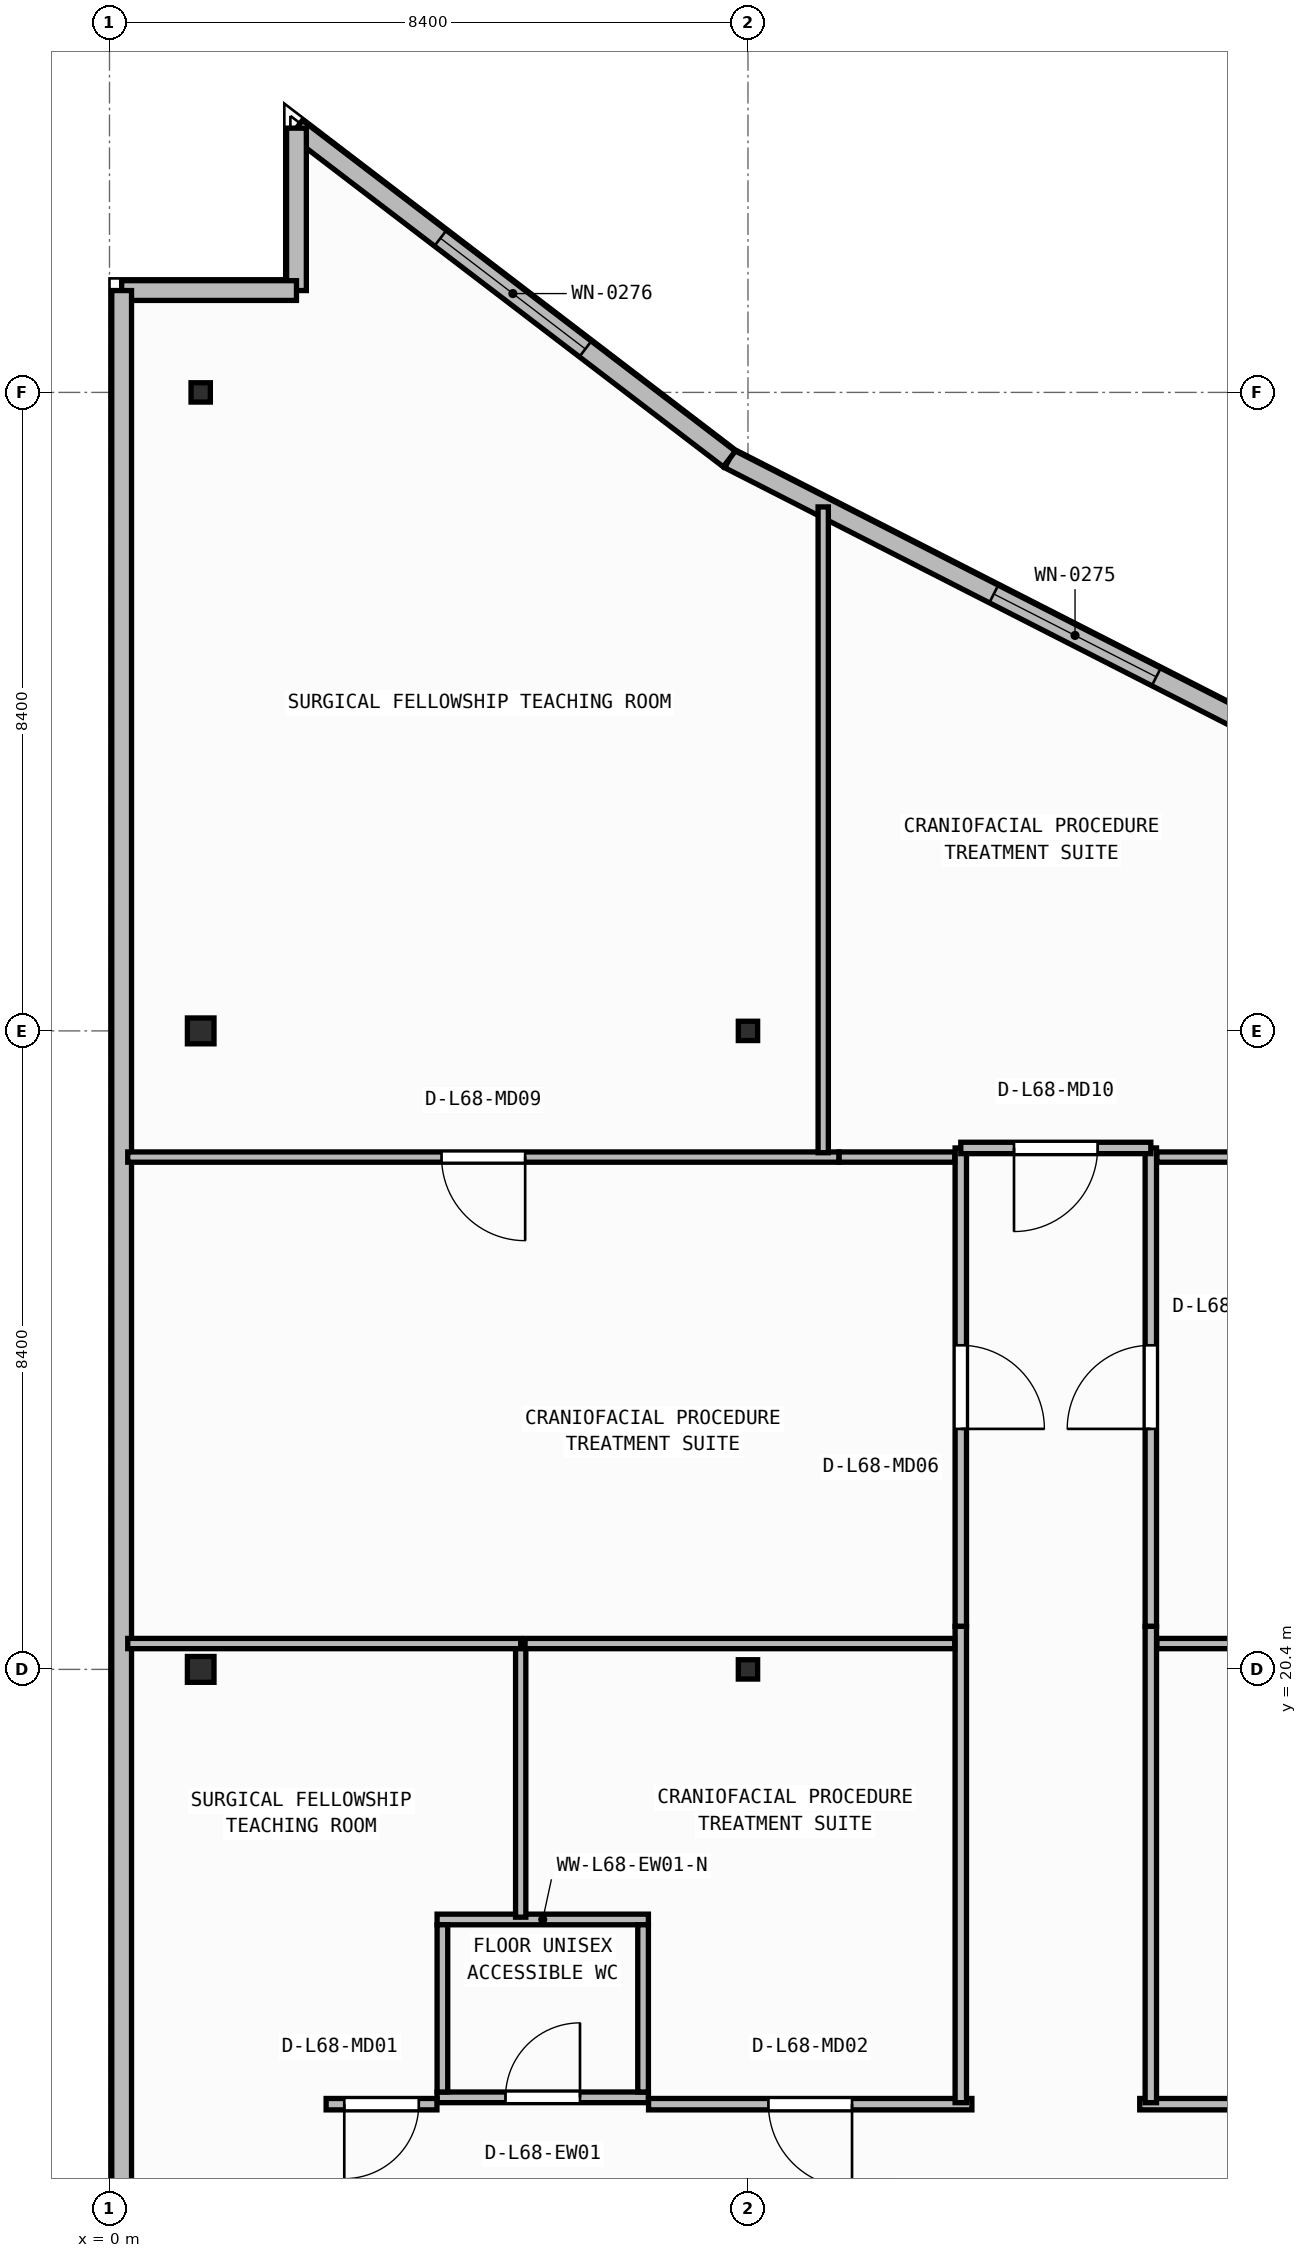
"""IFC4 building model, lengths in metres.
Left out: names, types, materials, properties, quantities, classifications, styles, units other than length and angle.
Written with IfcOpenShell. Run it as: python <this file> out.ifc"""

import sys

from ifc_helpers import new_model, si_unit, direction, frame, frame_2d, origin, origin_2d, place, context, subcontext, project, spatial, rectangle, i_section, extrude, element, fill, save


model = new_model("IFC4")
c1 = context("Model", 3, precision=1e-05, world=origin(), true_north=direction((0.0, 1.0)))
c2 = subcontext(c1, "Body", "Model", "MODEL_VIEW")
j1 = project(units=[si_unit("LENGTHUNIT", "METRE"), si_unit("PLANEANGLEUNIT", "RADIAN")], contexts=[c1])
p1 = place(None, origin())
s1 = spatial("IfcSite", under=j1, at=p1, CompositionType="ELEMENT")
p2 = place(p1, origin())
s2 = spatial("IfcBuilding", under=s1, at=p2, CompositionType="ELEMENT")
p3 = place(p2, frame((0.0, 0.0, 276.3)))
s3 = spatial("IfcBuildingStorey", under=s2, at=p3, CompositionType="ELEMENT", Elevation=276.3)
p4 = place(p3, frame((1.2, 20.4, 0.0), z_axis=(0.0, 0.0, 1.0), x_axis=(1.0, 0.0, 0.0)))
e1 = element("IfcColumn", 1, at=p4, inside=s3, PredefinedType="COLUMN", context=c2, shape_type="SweptSolid", body=[
    extrude(i_section(OverallWidth=0.35, OverallDepth=0.34, WebThickness=0.016, FlangeThickness=0.028, at=origin_2d()), origin(), (0.0, 0.0, 1.0), 3.95),
])
p5 = place(p3, frame((8.4, 20.4, 0.0), z_axis=(0.0, 0.0, 1.0), x_axis=(1.0, 0.0, 0.0)))
e2 = element("IfcColumn", 2, at=p5, inside=s3, PredefinedType="COLUMN", context=c2, shape_type="SweptSolid", body=[
    extrude(i_section(OverallWidth=0.254, OverallDepth=0.254, WebThickness=0.009, FlangeThickness=0.014, FilletRadius=0.013, at=origin_2d()), origin(), (0.0, 0.0, 1.0), 3.95),
])
p6 = place(p3, frame((1.2, 28.8, 0.0), z_axis=(0.0, 0.0, 1.0), x_axis=(1.0, 0.0, 0.0)))
e3 = element("IfcColumn", 3, at=p6, inside=s3, PredefinedType="COLUMN", context=c2, shape_type="SweptSolid", body=[
    extrude(i_section(OverallWidth=0.35, OverallDepth=0.34, WebThickness=0.016, FlangeThickness=0.028, at=origin_2d()), origin(), (0.0, 0.0, 1.0), 3.95),
])
for number, where, z_axis, x_axis in (
    (4, (8.4, 28.8, 0.0), (0.0, 0.0, 1.0), (1.0, 0.0, 0.0)),
    (5, (1.2, 37.2, 0.0), (0.0, 0.0, 1.0), (1.0, 0.0, 0.0)),
):
    element("IfcColumn", number, at=place(p3, frame(where, z_axis=z_axis, x_axis=x_axis)), inside=s3, PredefinedType="COLUMN", context=c2, shape_type="SweptSolid", body=[
        extrude(i_section(OverallWidth=0.254, OverallDepth=0.254, WebThickness=0.009, FlangeThickness=0.014, FilletRadius=0.013, at=origin_2d()), origin(), (0.0, 0.0, 1.0), 3.95),
    ])
p7 = place(p3, frame((17.251, 31.681, 0.0), z_axis=(0.0, 0.0, 1.0), x_axis=(-0.89069629535, 0.454598844532, 0.0)))
e6 = element("IfcWall", 6, at=p7, inside=s3, PredefinedType="STANDARD", context=c2, shape_type="SweptSolid", body=[
    extrude(rectangle(XDim=10.214, YDim=0.26, at=frame_2d((5.107, 0.0))), origin(), (0.0, 0.0, 1.0), 3.71),
])
p8 = place(p7, frame((3.907, 0.0, 0.9)))
e7 = element("IfcOpeningElement", 7, at=p8, cuts=e6, PredefinedType="OPENING", context=c2, shape_type="SweptSolid", body=[
    extrude(rectangle(XDim=2.4, YDim=1.65, at=frame_2d((1.2, 0.825))), frame((0.0, 0.14, 0.0), z_axis=(0.0, -1.0, 0.0), x_axis=(1.0, 0.0, 0.0)), (0.0, 0.0, 1.0), 0.28),
])
p9 = place(p3, frame((8.154, 36.324, 0.0), z_axis=(0.0, 0.0, 1.0), x_axis=(-0.794522176632, 0.607235136368, 0.0)))
e8 = element("IfcWall", 8, at=p9, inside=s3, PredefinedType="STANDARD", context=c2, shape_type="SweptSolid", body=[
    extrude(rectangle(XDim=7.167, YDim=0.26, at=frame_2d((3.583, 0.0))), origin(), (0.0, 0.0, 1.0), 3.71),
])
p10 = place(p9, frame((2.384, 0.0, 0.9)))
e9 = element("IfcOpeningElement", 9, at=p10, cuts=e8, PredefinedType="OPENING", context=c2, shape_type="SweptSolid", body=[
    extrude(rectangle(XDim=2.4, YDim=1.65, at=frame_2d((1.2, 0.825))), frame((0.0, 0.14, 0.0), z_axis=(0.0, -1.0, 0.0), x_axis=(1.0, 0.0, 0.0)), (0.0, 0.0, 1.0), 0.28),
])
p11 = place(p3, frame((2.46, 40.676, 0.0), z_axis=(0.0, 0.0, 1.0), x_axis=(0.0, -1.0, 0.0)))
e10 = element("IfcWall", 10, at=p11, inside=s3, PredefinedType="STANDARD", context=c2, shape_type="SweptSolid", body=[
    extrude(rectangle(XDim=2.136, YDim=0.26, at=frame_2d((1.068, 0.0))), origin(), (0.0, 0.0, 1.0), 3.71),
])
p12 = place(p3, frame((2.46, 38.54, 0.0), z_axis=(0.0, 0.0, 1.0), x_axis=(-1.0, 0.0, 0.0)))
e11 = element("IfcWall", 11, at=p12, inside=s3, PredefinedType="STANDARD", context=c2, shape_type="SweptSolid", body=[
    extrude(rectangle(XDim=2.3, YDim=0.26, at=frame_2d((1.15, 0.0))), origin(), (0.0, 0.0, 1.0), 3.71),
])
p13 = place(p3, frame((0.16, 38.54, 0.0), z_axis=(0.0, 0.0, 1.0), x_axis=(0.0, -1.0, 0.0)))
e12 = element("IfcWall", 12, at=p13, inside=s3, PredefinedType="STANDARD", context=c2, shape_type="SweptSolid", body=[
    extrude(rectangle(XDim=36.08, YDim=0.26, at=frame_2d((18.04, 0.0))), origin(), (0.0, 0.0, 1.0), 3.71),
])
p14 = place(p13, frame((25.75, 0.0, 0.9)))
e13 = element("IfcOpeningElement", 13, at=p14, cuts=e12, PredefinedType="OPENING", context=c2, shape_type="SweptSolid", body=[
    extrude(rectangle(XDim=2.4, YDim=1.65, at=frame_2d((1.2, 0.825))), frame((0.0, 0.14, 0.0), z_axis=(0.0, -1.0, 0.0), x_axis=(1.0, 0.0, 0.0)), (0.0, 0.0, 1.0), 0.28),
])
p15 = place(p3, frame((4.31, 14.77, 0.0), z_axis=(0.0, 0.0, 1.0), x_axis=(1.0, 0.0, 0.0)))
e14 = element("IfcWall", 14, at=p15, inside=s3, PredefinedType="PARTITIONING", context=c2, shape_type="SweptSolid", body=[
    extrude(rectangle(XDim=2.78, YDim=0.14, at=frame_2d((1.39, 0.0))), origin(), (0.0, 0.0, 1.0), 3.71),
])
p16 = place(p15, frame((0.9, 0.0, 0.0)))
e15 = element("IfcOpeningElement", 15, at=p16, cuts=e14, PredefinedType="OPENING", context=c2, shape_type="SweptSolid", body=[
    extrude(rectangle(XDim=0.98, YDim=2.1, at=frame_2d((0.49, 1.05))), frame((0.0, 0.08, 0.0), z_axis=(0.0, -1.0, 0.0), x_axis=(1.0, 0.0, 0.0)), (0.0, 0.0, 1.0), 0.16),
])
p17 = place(p3, frame((4.31, 17.11, 0.0), z_axis=(0.0, 0.0, 1.0), x_axis=(1.0, 0.0, 0.0)))
e16 = element("IfcWall", 16, at=p17, inside=s3, PredefinedType="PARTITIONING", context=c2, shape_type="SweptSolid", body=[
    extrude(rectangle(XDim=2.78, YDim=0.14, at=frame_2d((1.39, 0.0))), origin(), (0.0, 0.0, 1.0), 3.71),
])
for number, where, z_axis, x_axis in (
    (17, (4.38, 14.84, 0.0), (0.0, 0.0, 1.0), (0.0, 1.0, 0.0)),
    (18, (7.02, 14.84, 0.0), (0.0, 0.0, 1.0), (0.0, 1.0, 0.0)),
):
    element("IfcWall", number, at=place(p3, frame(where, z_axis=z_axis, x_axis=x_axis)), inside=s3, PredefinedType="PARTITIONING", context=c2, shape_type="SweptSolid", body=[
        extrude(rectangle(XDim=2.2, YDim=0.14, at=frame_2d((1.1, 0.0))), origin(), (0.0, 0.0, 1.0), 3.71),
    ])
p18 = place(p3, frame((4.308, 14.68, 0.0), z_axis=(0.0, 0.0, 1.0), x_axis=(-1.0, 0.0, 0.0)))
e19 = element("IfcWall", 19, at=p18, inside=s3, PredefinedType="PARTITIONING", context=c2, shape_type="SweptSolid", body=[
    extrude(rectangle(XDim=1.458, YDim=0.15, at=frame_2d((0.729, 0.0))), origin(), (0.0, 0.0, 1.0), 3.71),
])
p19 = place(p18, frame((0.239, 0.0, 0.0)))
e20 = element("IfcOpeningElement", 20, at=p19, cuts=e19, PredefinedType="OPENING", context=c2, shape_type="SweptSolid", body=[
    extrude(rectangle(XDim=0.98, YDim=2.1, at=frame_2d((0.49, 1.05))), frame((0.0, 0.085, 0.0), z_axis=(0.0, -1.0, 0.0), x_axis=(1.0, 0.0, 0.0)), (0.0, 0.0, 1.0), 0.17),
])
p20 = place(p3, frame((11.346, 14.68, 0.0), z_axis=(0.0, 0.0, 1.0), x_axis=(-1.0, 0.0, 0.0)))
e21 = element("IfcWall", 21, at=p20, inside=s3, PredefinedType="PARTITIONING", context=c2, shape_type="SweptSolid", body=[
    extrude(rectangle(XDim=4.254, YDim=0.15, at=frame_2d((2.127, 0.0))), origin(), (0.0, 0.0, 1.0), 3.71),
])
p21 = place(p20, frame((1.577, 0.0, 0.0)))
e22 = element("IfcOpeningElement", 22, at=p21, cuts=e21, PredefinedType="OPENING", context=c2, shape_type="SweptSolid", body=[
    extrude(rectangle(XDim=1.1, YDim=2.1, at=frame_2d((0.55, 1.05))), frame((0.0, 0.085, 0.0), z_axis=(0.0, -1.0, 0.0), x_axis=(1.0, 0.0, 0.0)), (0.0, 0.0, 1.0), 0.17),
])
p22 = place(p3, frame((18.116, 14.68, 0.0), z_axis=(0.0, 0.0, 1.0), x_axis=(-1.0, 0.0, 0.0)))
e23 = element("IfcWall", 23, at=p22, inside=s3, PredefinedType="PARTITIONING", context=c2, shape_type="SweptSolid", body=[
    extrude(rectangle(XDim=4.562, YDim=0.15, at=frame_2d((2.281, 0.0))), origin(), (0.0, 0.0, 1.0), 3.71),
])
p23 = place(p22, frame((1.731, 0.0, 0.0)))
e24 = element("IfcOpeningElement", 24, at=p23, cuts=e23, PredefinedType="OPENING", context=c2, shape_type="SweptSolid", body=[
    extrude(rectangle(XDim=1.1, YDim=2.1, at=frame_2d((0.55, 1.05))), frame((0.0, 0.085, 0.0), z_axis=(0.0, -1.0, 0.0), x_axis=(1.0, 0.0, 0.0)), (0.0, 0.0, 1.0), 0.17),
])
for number, where, z_axis, x_axis in (
    (25, (11.2, 20.966, 0.0), (0.0, 0.0, 1.0), (0.0, -1.0, 0.0)),
    (26, (13.7, 14.7, 0.0), (0.0, 0.0, 1.0), (0.0, 1.0, 0.0)),
):
    element("IfcWall", number, at=place(p3, frame(where, z_axis=z_axis, x_axis=x_axis)), inside=s3, PredefinedType="PARTITIONING", context=c2, shape_type="SweptSolid", body=[
        extrude(rectangle(XDim=6.266, YDim=0.15, at=frame_2d((3.133, 0.0))), origin(), (0.0, 0.0, 1.0), 3.71),
    ])
p24 = place(p3, frame((11.2, 27.26, 0.0), z_axis=(0.0, 0.0, 1.0), x_axis=(0.0, -1.0, 0.0)))
e27 = element("IfcWall", 27, at=p24, inside=s3, PredefinedType="PARTITIONING", context=c2, shape_type="SweptSolid", body=[
    extrude(rectangle(XDim=6.292, YDim=0.15, at=frame_2d((3.146, 0.0))), origin(), (0.0, 0.0, 1.0), 3.71),
])
p25 = place(p24, frame((2.596, 0.0, 0.0)))
e28 = element("IfcOpeningElement", 28, at=p25, cuts=e27, PredefinedType="OPENING", context=c2, shape_type="SweptSolid", body=[
    extrude(rectangle(XDim=1.1, YDim=2.1, at=frame_2d((0.55, 1.05))), frame((0.0, 0.085, 0.0), z_axis=(0.0, -1.0, 0.0), x_axis=(1.0, 0.0, 0.0)), (0.0, 0.0, 1.0), 0.17),
])
p26 = place(p3, frame((13.7, 20.968, 0.0), z_axis=(0.0, 0.0, 1.0), x_axis=(0.0, 1.0, 0.0)))
e29 = element("IfcWall", 29, at=p26, inside=s3, PredefinedType="PARTITIONING", context=c2, shape_type="SweptSolid", body=[
    extrude(rectangle(XDim=6.292, YDim=0.15, at=frame_2d((3.146, 0.0))), origin(), (0.0, 0.0, 1.0), 3.71),
])
p27 = place(p26, frame((2.596, 0.0, 0.0)))
e30 = element("IfcOpeningElement", 30, at=p27, cuts=e29, PredefinedType="OPENING", context=c2, shape_type="SweptSolid", body=[
    extrude(rectangle(XDim=1.1, YDim=2.1, at=frame_2d((0.55, 1.05))), frame((0.0, 0.085, 0.0), z_axis=(0.0, -1.0, 0.0), x_axis=(1.0, 0.0, 0.0)), (0.0, 0.0, 1.0), 0.17),
])
p28 = place(p3, frame((13.7, 27.26, 0.0), z_axis=(0.0, 0.0, 1.0), x_axis=(-1.0, 0.0, 0.0)))
e31 = element("IfcWall", 31, at=p28, inside=s3, PredefinedType="PARTITIONING", context=c2, shape_type="SweptSolid", body=[
    extrude(rectangle(XDim=2.5, YDim=0.15, at=frame_2d((1.25, 0.0))), origin(), (0.0, 0.0, 1.0), 3.71),
])
p29 = place(p28, frame((0.7, 0.0, 0.0)))
e32 = element("IfcOpeningElement", 32, at=p29, cuts=e31, PredefinedType="OPENING", context=c2, shape_type="SweptSolid", body=[
    extrude(rectangle(XDim=1.1, YDim=2.1, at=frame_2d((0.55, 1.05))), frame((0.0, 0.085, 0.0), z_axis=(0.0, -1.0, 0.0), x_axis=(1.0, 0.0, 0.0)), (0.0, 0.0, 1.0), 0.17),
])
p30 = place(p3, frame((5.41, 17.14, 0.0), z_axis=(0.0, 0.0, 1.0), x_axis=(0.0, 1.0, 0.0)))
e33 = element("IfcWall", 33, at=p30, inside=s3, PredefinedType="PARTITIONING", context=c2, shape_type="SweptSolid", body=[
    extrude(rectangle(XDim=3.6, YDim=0.135, at=frame_2d((1.8, 0.0))), origin(), (0.0, 0.0, 1.0), 3.71),
])
p31 = place(p3, frame((5.41, 20.74, 0.0), z_axis=(0.0, 0.0, 1.0), x_axis=(-1.0, 0.0, 0.0)))
e34 = element("IfcWall", 34, at=p31, inside=s3, PredefinedType="PARTITIONING", context=c2, shape_type="SweptSolid", body=[
    extrude(rectangle(XDim=5.17, YDim=0.135, at=frame_2d((2.585, 0.0))), origin(), (0.0, 0.0, 1.0), 3.157),
])
p32 = place(p3, frame((11.12, 20.74, 0.0), z_axis=(0.0, 0.0, 1.0), x_axis=(-1.0, 0.0, 0.0)))
e35 = element("IfcWall", 35, at=p32, inside=s3, PredefinedType="PARTITIONING", context=c2, shape_type="SweptSolid", body=[
    extrude(rectangle(XDim=5.653, YDim=0.135, at=frame_2d((2.826, 0.0))), origin(), (0.0, 0.0, 1.0), 3.157),
])
p33 = place(p3, frame((17.89, 20.74, 0.0), z_axis=(0.0, 0.0, 1.0), x_axis=(-1.0, 0.0, 0.0)))
e36 = element("IfcWall", 36, at=p33, inside=s3, PredefinedType="PARTITIONING", context=c2, shape_type="SweptSolid", body=[
    extrude(rectangle(XDim=4.11, YDim=0.135, at=frame_2d((2.055, 0.0))), origin(), (0.0, 0.0, 1.0), 3.157),
])
p34 = place(p3, frame((9.597, 27.14, 0.0), z_axis=(0.0, 0.0, 1.0), x_axis=(-1.0, 0.0, 0.0)))
e37 = element("IfcWall", 37, at=p34, inside=s3, PredefinedType="PARTITIONING", context=c2, shape_type="SweptSolid", body=[
    extrude(rectangle(XDim=9.357, YDim=0.135, at=frame_2d((4.679, 0.0))), origin(), (0.0, 0.0, 1.0), 3.71),
])
p35 = place(p34, frame((4.129, 0.0, 0.0)))
e38 = element("IfcOpeningElement", 38, at=p35, cuts=e37, PredefinedType="OPENING", context=c2, shape_type="SweptSolid", body=[
    extrude(rectangle(XDim=1.1, YDim=2.1, at=frame_2d((0.55, 1.05))), frame((0.0, 0.077, 0.0), z_axis=(0.0, -1.0, 0.0), x_axis=(1.0, 0.0, 0.0)), (0.0, 0.0, 1.0), 0.155),
])
p36 = place(p3, frame((11.12, 27.14, 0.0), z_axis=(0.0, 0.0, 1.0), x_axis=(-1.0, 0.0, 0.0)))
e39 = element("IfcWall", 39, at=p36, inside=s3, PredefinedType="PARTITIONING", context=c2, shape_type="SweptSolid", body=[
    extrude(rectangle(XDim=1.521, YDim=0.135, at=frame_2d((0.76, 0.0))), origin(), (0.0, 0.0, 1.0), 3.71),
])
p37 = place(p3, frame((20.748, 27.14, 0.0), z_axis=(0.0, 0.0, 1.0), x_axis=(-1.0, 0.0, 0.0)))
e40 = element("IfcWall", 40, at=p37, inside=s3, PredefinedType="PARTITIONING", context=c2, shape_type="SweptSolid", body=[
    extrude(rectangle(XDim=6.968, YDim=0.135, at=frame_2d((3.484, 0.0))), origin(), (0.0, 0.0, 1.0), 3.71),
])
p38 = place(p3, frame((9.39, 27.198, 0.0), z_axis=(0.0, 0.0, 1.0), x_axis=(0.0, 1.0, 0.0)))
e41 = element("IfcWall", 41, at=p38, inside=s3, PredefinedType="PARTITIONING", context=c2, shape_type="SweptSolid", body=[
    extrude(rectangle(XDim=8.496, YDim=0.135, at=frame_2d((4.248, 0.0))), origin(), (0.0, 0.0, 1.0), 3.71),
])
p39 = place(p8, origin())
e42 = element("IfcWindow", 42, at=p39, inside=s3, PartitioningType="SINGLE_PANEL", PredefinedType="WINDOW", context=c2, shape_type="SweptSolid", body=[
    extrude(rectangle(XDim=2.4, YDim=1.65, at=frame_2d((1.2, 0.825))), frame((0.0, 0.03, 0.0), z_axis=(0.0, -1.0, 0.0), x_axis=(1.0, 0.0, 0.0)), (0.0, 0.0, 1.0), 0.06),
])
fill(e7, e42)
p40 = place(p10, origin())
e43 = element("IfcWindow", 43, at=p40, inside=s3, PartitioningType="SINGLE_PANEL", PredefinedType="WINDOW", context=c2, shape_type="SweptSolid", body=[
    extrude(rectangle(XDim=2.4, YDim=1.65, at=frame_2d((1.2, 0.825))), frame((0.0, 0.03, 0.0), z_axis=(0.0, -1.0, 0.0), x_axis=(1.0, 0.0, 0.0)), (0.0, 0.0, 1.0), 0.06),
])
fill(e9, e43)
p41 = place(p16, origin())
e44 = element("IfcDoor", 44, at=p41, inside=s3, OperationType="SINGLE_SWING_RIGHT", PredefinedType="DOOR", context=c2, shape_type="SweptSolid", body=[
    extrude(rectangle(XDim=0.98, YDim=2.1, at=frame_2d((0.49, 1.05))), frame((0.0, 0.025, 0.0), z_axis=(0.0, -1.0, 0.0), x_axis=(1.0, 0.0, 0.0)), (0.0, 0.0, 1.0), 0.05),
])
fill(e15, e44)
p42 = place(p19, origin())
e45 = element("IfcDoor", 45, at=p42, inside=s3, OperationType="SINGLE_SWING_RIGHT", PredefinedType="DOOR", context=c2, shape_type="SweptSolid", body=[
    extrude(rectangle(XDim=0.98, YDim=2.1, at=frame_2d((0.49, 1.05))), frame((0.0, 0.025, 0.0), z_axis=(0.0, -1.0, 0.0), x_axis=(1.0, 0.0, 0.0)), (0.0, 0.0, 1.0), 0.05),
])
fill(e20, e45)
p43 = place(p21, origin())
e46 = element("IfcDoor", 46, at=p43, inside=s3, OperationType="SINGLE_SWING_LEFT", PredefinedType="DOOR", context=c2, shape_type="SweptSolid", body=[
    extrude(rectangle(XDim=1.1, YDim=2.1, at=frame_2d((0.55, 1.05))), frame((0.0, 0.025, 0.0), z_axis=(0.0, -1.0, 0.0), x_axis=(1.0, 0.0, 0.0)), (0.0, 0.0, 1.0), 0.05),
])
fill(e22, e46)
p44 = place(p25, origin())
e47 = element("IfcDoor", 47, at=p44, inside=s3, OperationType="SINGLE_SWING_RIGHT", PredefinedType="DOOR", context=c2, shape_type="SweptSolid", body=[
    extrude(rectangle(XDim=1.1, YDim=2.1, at=frame_2d((0.55, 1.05))), frame((0.0, 0.025, 0.0), z_axis=(0.0, -1.0, 0.0), x_axis=(1.0, 0.0, 0.0)), (0.0, 0.0, 1.0), 0.05),
])
fill(e28, e47)
p45 = place(p27, origin())
e48 = element("IfcDoor", 48, at=p45, inside=s3, OperationType="SINGLE_SWING_LEFT", PredefinedType="DOOR", context=c2, shape_type="SweptSolid", body=[
    extrude(rectangle(XDim=1.1, YDim=2.1, at=frame_2d((0.55, 1.05))), frame((0.0, 0.025, 0.0), z_axis=(0.0, -1.0, 0.0), x_axis=(1.0, 0.0, 0.0)), (0.0, 0.0, 1.0), 0.05),
])
fill(e30, e48)
p46 = place(p29, origin())
e49 = element("IfcDoor", 49, at=p46, inside=s3, OperationType="SINGLE_SWING_RIGHT", PredefinedType="DOOR", context=c2, shape_type="SweptSolid", body=[
    extrude(rectangle(XDim=1.1, YDim=2.1, at=frame_2d((0.55, 1.05))), frame((0.0, 0.025, 0.0), z_axis=(0.0, -1.0, 0.0), x_axis=(1.0, 0.0, 0.0)), (0.0, 0.0, 1.0), 0.05),
])
fill(e32, e49)
p47 = place(p35, origin())
e50 = element("IfcDoor", 50, at=p47, inside=s3, OperationType="SINGLE_SWING_LEFT", PredefinedType="DOOR", context=c2, shape_type="SweptSolid", body=[
    extrude(rectangle(XDim=1.1, YDim=2.1, at=frame_2d((0.55, 1.05))), frame((0.0, 0.025, 0.0), z_axis=(0.0, -1.0, 0.0), x_axis=(1.0, 0.0, 0.0)), (0.0, 0.0, 1.0), 0.05),
])
fill(e38, e50)
save(model, sys.argv[1])
